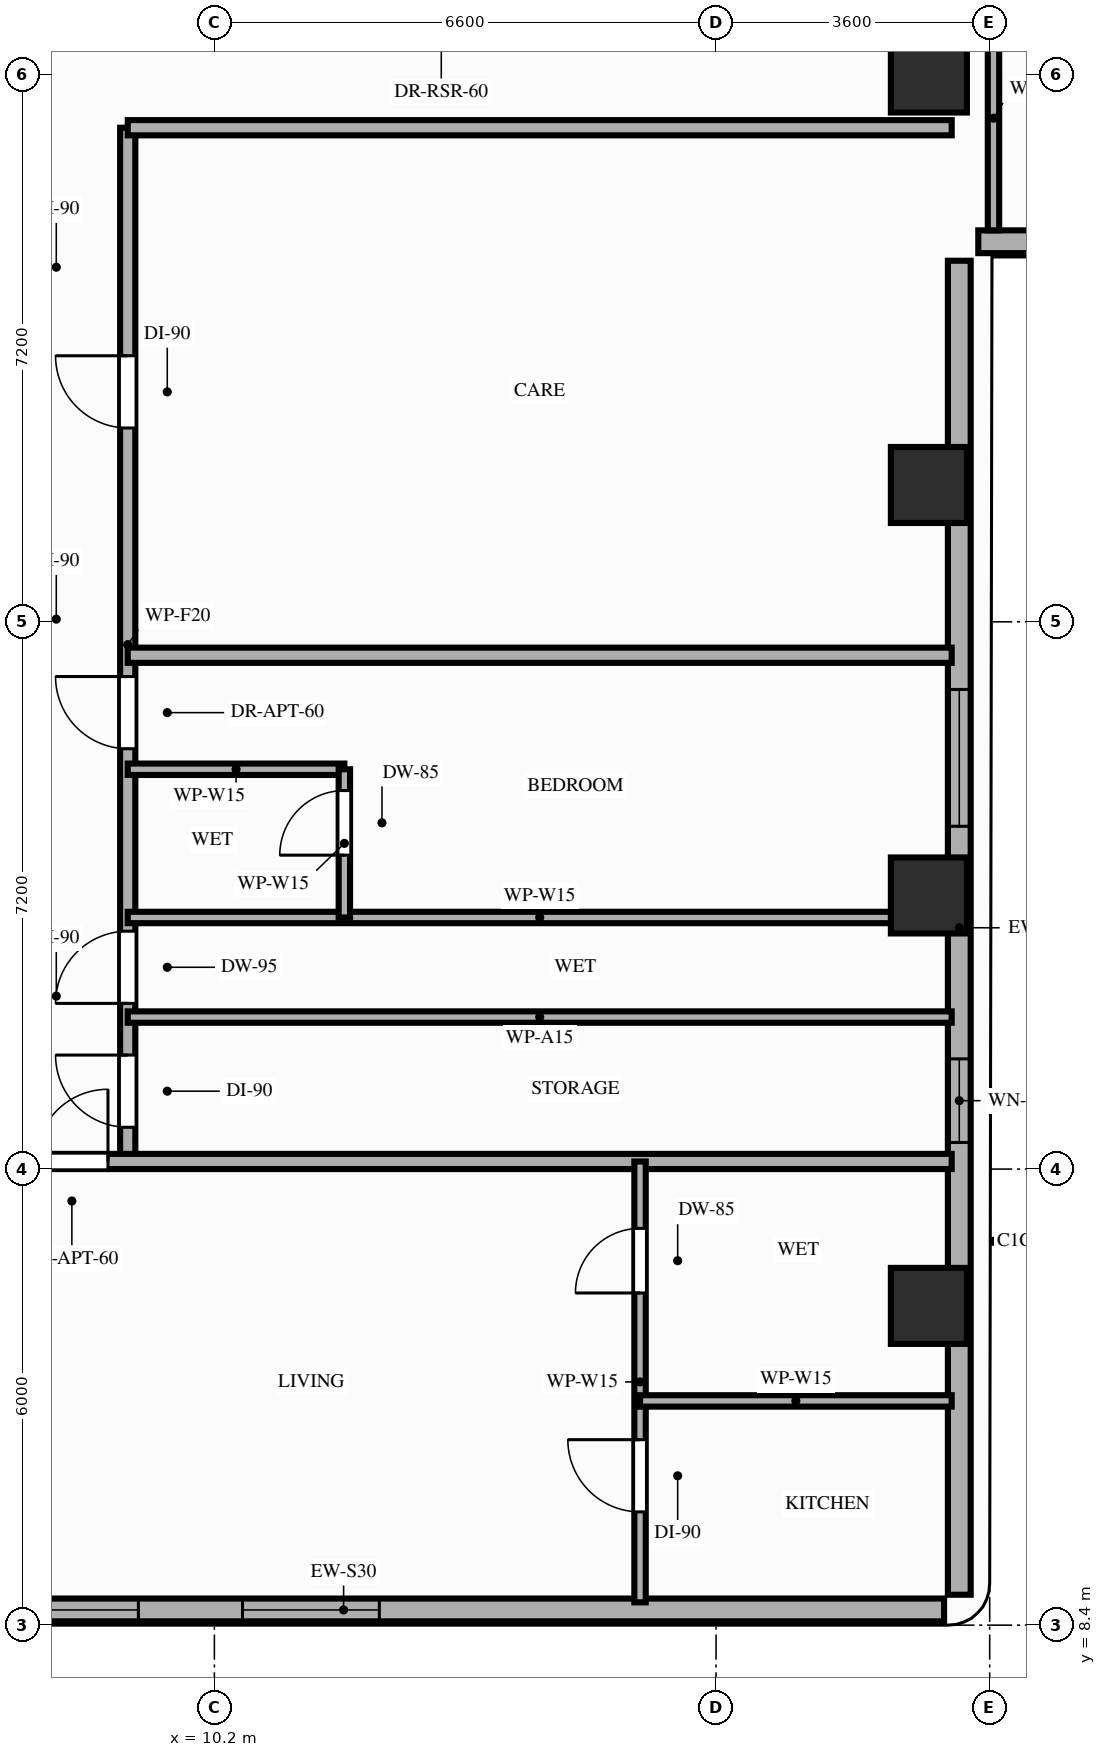
"""IFC4 building model, lengths in metres.
Left out: names, types, materials, properties, quantities, classifications, styles, units other than length and angle.
Written with IfcOpenShell. Run it as: python <this file> out.ifc"""

import sys

from ifc_helpers import new_model, si_unit, direction, frame, frame_2d, origin, origin_2d, place, context, subcontext, project, spatial, rectangle, extrude, element, fill, save


model = new_model("IFC4")
c1 = context("Model", 3, precision=1e-05, world=origin(), true_north=direction((0.0, 1.0)))
c2 = subcontext(c1, "Body", "Model", "MODEL_VIEW")
j1 = project(units=[si_unit("LENGTHUNIT", "METRE"), si_unit("PLANEANGLEUNIT", "RADIAN")], contexts=[c1])
p1 = place(None, origin())
s1 = spatial("IfcSite", under=j1, at=p1, CompositionType="ELEMENT")
p2 = place(p1, origin())
s2 = spatial("IfcBuilding", under=s1, at=p2, CompositionType="ELEMENT")
p3 = place(p2, frame((0.0, 0.0, 113.8)))
s3 = spatial("IfcBuildingStorey", under=s2, at=p3, CompositionType="ELEMENT", Elevation=113.8)
for number, where, z_axis, x_axis in (
    (1, (19.6, 12.6, 0.0), (0.0, 0.0, 1.0), (1.0, 0.0, 0.0)),
    (2, (19.6, 18.0, 0.0), (0.0, 0.0, 1.0), (1.0, 0.0, 0.0)),
    (3, (19.6, 23.4, 0.0), (0.0, 0.0, 1.0), (1.0, 0.0, 0.0)),
    (4, (19.6, 28.8, 0.0), (0.0, 0.0, 1.0), (1.0, 0.0, 0.0)),
):
    element("IfcColumn", number, at=place(p3, frame(where, z_axis=z_axis, x_axis=x_axis)), inside=s3, PredefinedType="COLUMN", context=c2, shape_type="SweptSolid", body=[
        extrude(rectangle(XDim=1.0, YDim=1.0, at=origin_2d()), origin(), (0.0, 0.0, 1.0), 3.2),
    ])
p4 = place(p3, frame((4.0, 8.6, 0.0), z_axis=(0.0, 0.0, 1.0), x_axis=(1.0, 0.0, 0.0)))
e5 = element("IfcWall", 5, at=p4, inside=s3, PredefinedType="STANDARD", context=c2, shape_type="SweptSolid", body=[
    extrude(rectangle(XDim=15.8, YDim=0.3, at=frame_2d((7.9, 0.0))), origin(), (0.0, 0.0, 1.0), 3.02),
])
p5 = place(p4, frame((6.57, 0.0, 0.85)))
e6 = element("IfcOpeningElement", 6, at=p5, cuts=e5, PredefinedType="OPENING", context=c2, shape_type="SweptSolid", body=[
    extrude(rectangle(XDim=1.8, YDim=1.75, at=frame_2d((0.9, 0.875))), frame((0.0, 0.16, 0.0), z_axis=(0.0, -1.0, 0.0), x_axis=(1.0, 0.0, 0.0)), (0.0, 0.0, 1.0), 0.32),
])
p6 = place(p4, frame((3.4, 0.0, 0.85)))
e7 = element("IfcOpeningElement", 7, at=p6, cuts=e5, PredefinedType="OPENING", context=c2, shape_type="SweptSolid", body=[
    extrude(rectangle(XDim=1.8, YDim=1.75, at=frame_2d((0.9, 0.875))), frame((0.0, 0.16, 0.0), z_axis=(0.0, -1.0, 0.0), x_axis=(1.0, 0.0, 0.0)), (0.0, 0.0, 1.0), 0.32),
])
p7 = place(p3, frame((20.0, 8.8, 0.0), z_axis=(0.0, 0.0, 1.0), x_axis=(0.0, 1.0, 0.0)))
e8 = element("IfcWall", 8, at=p7, inside=s3, PredefinedType="STANDARD", context=c2, shape_type="SweptSolid", body=[
    extrude(rectangle(XDim=17.55, YDim=0.3, at=frame_2d((8.775, 0.0))), origin(), (0.0, 0.0, 1.0), 2.4),
])
p8 = place(p7, frame((10.11, 0.0, 0.85)))
e9 = element("IfcOpeningElement", 9, at=p8, cuts=e8, PredefinedType="OPENING", context=c2, shape_type="SweptSolid", body=[
    extrude(rectangle(XDim=1.8, YDim=1.3, at=frame_2d((0.9, 0.65))), frame((0.0, 0.16, 0.0), z_axis=(0.0, -1.0, 0.0), x_axis=(1.0, 0.0, 0.0)), (0.0, 0.0, 1.0), 0.32),
])
p9 = place(p7, frame((5.95, 0.0, 0.85)))
e10 = element("IfcOpeningElement", 10, at=p9, cuts=e8, PredefinedType="OPENING", context=c2, shape_type="SweptSolid", body=[
    extrude(rectangle(XDim=1.1, YDim=1.3, at=frame_2d((0.55, 0.65))), frame((0.0, 0.16, 0.0), z_axis=(0.0, -1.0, 0.0), x_axis=(1.0, 0.0, 0.0)), (0.0, 0.0, 1.0), 0.32),
])
p10 = place(p3, frame((20.25, 26.6, 0.0), z_axis=(0.0, 0.0, 1.0), x_axis=(1.0, 0.0, 0.0)))
e11 = element("IfcWall", 11, at=p10, inside=s3, PredefinedType="STANDARD", context=c2, shape_type="SweptSolid", body=[
    extrude(rectangle(XDim=26.15, YDim=0.3, at=frame_2d((13.075, 0.0))), origin(), (0.0, 0.0, 1.0), 2.7),
])
p11 = place(p10, frame((13.85, 0.0, 0.0)))
e12 = element("IfcOpeningElement", 12, at=p11, cuts=e11, PredefinedType="OPENING", context=c2, shape_type="SweptSolid", body=[
    extrude(rectangle(XDim=1.4, YDim=2.1, at=frame_2d((0.7, 1.05))), frame((0.0, 0.16, 0.0), z_axis=(0.0, -1.0, 0.0), x_axis=(1.0, 0.0, 0.0)), (0.0, 0.0, 1.0), 0.32),
])
p12 = place(p10, frame((2.65, 0.0, 0.85)))
e13 = element("IfcOpeningElement", 13, at=p12, cuts=e11, PredefinedType="OPENING", context=c2, shape_type="SweptSolid", body=[
    extrude(rectangle(XDim=1.8, YDim=1.6, at=frame_2d((0.9, 0.8))), frame((0.0, 0.16, 0.0), z_axis=(0.0, -1.0, 0.0), x_axis=(1.0, 0.0, 0.0)), (0.0, 0.0, 1.0), 0.32),
])
p13 = place(p10, frame((7.75, 0.0, 0.85)))
e14 = element("IfcOpeningElement", 14, at=p13, cuts=e11, PredefinedType="OPENING", context=c2, shape_type="SweptSolid", body=[
    extrude(rectangle(XDim=1.8, YDim=1.6, at=frame_2d((0.9, 0.8))), frame((0.0, 0.16, 0.0), z_axis=(0.0, -1.0, 0.0), x_axis=(1.0, 0.0, 0.0)), (0.0, 0.0, 1.0), 0.32),
])
p14 = place(p10, frame((22.25, 0.0, 0.85)))
e15 = element("IfcOpeningElement", 15, at=p14, cuts=e11, PredefinedType="OPENING", context=c2, shape_type="SweptSolid", body=[
    extrude(rectangle(XDim=1.8, YDim=1.6, at=frame_2d((0.9, 0.8))), frame((0.0, 0.16, 0.0), z_axis=(0.0, -1.0, 0.0), x_axis=(1.0, 0.0, 0.0)), (0.0, 0.0, 1.0), 0.32),
])
p15 = place(p3, frame((9.06, 14.5, 0.0), z_axis=(0.0, 0.0, 1.0), x_axis=(0.0, 1.0, 0.0)))
e16 = element("IfcWall", 16, at=p15, inside=s3, PredefinedType="PARTITIONING", context=c2, shape_type="SweptSolid", body=[
    extrude(rectangle(XDim=13.6, YDim=0.2, at=frame_2d((6.8, 0.0))), origin(), (0.0, 0.0, 1.0), 2.4),
])
p16 = place(p15, frame((0.45, 0.0, 0.0)))
e17 = element("IfcOpeningElement", 17, at=p16, cuts=e16, PredefinedType="OPENING", context=c2, shape_type="SweptSolid", body=[
    extrude(rectangle(XDim=0.95, YDim=2.15, at=frame_2d((0.475, 1.075))), frame((0.0, 0.11, 0.0), z_axis=(0.0, -1.0, 0.0), x_axis=(1.0, 0.0, 0.0)), (0.0, 0.0, 1.0), 0.22),
])
p17 = place(p15, frame((2.08, 0.0, 0.0)))
e18 = element("IfcOpeningElement", 18, at=p17, cuts=e16, PredefinedType="OPENING", context=c2, shape_type="SweptSolid", body=[
    extrude(rectangle(XDim=0.95, YDim=2.1, at=frame_2d((0.475, 1.05))), frame((0.0, 0.11, 0.0), z_axis=(0.0, -1.0, 0.0), x_axis=(1.0, 0.0, 0.0)), (0.0, 0.0, 1.0), 0.22),
])
p18 = place(p15, frame((9.65, 0.0, 0.0)))
e19 = element("IfcOpeningElement", 19, at=p18, cuts=e16, PredefinedType="OPENING", context=c2, shape_type="SweptSolid", body=[
    extrude(rectangle(XDim=0.95, YDim=2.15, at=frame_2d((0.475, 1.075))), frame((0.0, 0.11, 0.0), z_axis=(0.0, -1.0, 0.0), x_axis=(1.0, 0.0, 0.0)), (0.0, 0.0, 1.0), 0.22),
])
p19 = place(p15, frame((5.43, 0.0, 0.0)))
e20 = element("IfcOpeningElement", 20, at=p19, cuts=e16, PredefinedType="OPENING", context=c2, shape_type="SweptSolid", body=[
    extrude(rectangle(XDim=0.95, YDim=2.15, at=frame_2d((0.475, 1.075))), frame((0.0, 0.11, 0.0), z_axis=(0.0, -1.0, 0.0), x_axis=(1.0, 0.0, 0.0)), (0.0, 0.0, 1.0), 0.22),
])
p20 = place(p3, frame((3.9, 14.5, 0.0), z_axis=(0.0, 0.0, 1.0), x_axis=(1.0, 0.0, 0.0)))
e21 = element("IfcWall", 21, at=p20, inside=s3, PredefinedType="PARTITIONING", context=c2, shape_type="SweptSolid", body=[
    extrude(rectangle(XDim=16.0, YDim=0.2, at=frame_2d((8.0, 0.0))), origin(), (0.0, 0.0, 1.0), 2.4),
])
p21 = place(p20, frame((3.95, 0.0, 0.0)))
e22 = element("IfcOpeningElement", 22, at=p21, cuts=e21, PredefinedType="OPENING", context=c2, shape_type="SweptSolid", body=[
    extrude(rectangle(XDim=0.95, YDim=2.15, at=frame_2d((0.475, 1.075))), frame((0.0, 0.11, 0.0), z_axis=(0.0, -1.0, 0.0), x_axis=(1.0, 0.0, 0.0)), (0.0, 0.0, 1.0), 0.22),
])
p22 = place(p3, frame((9.06, 28.1, 0.0), z_axis=(0.0, 0.0, 1.0), x_axis=(1.0, 0.0, 0.0)))
e23 = element("IfcWall", 23, at=p22, inside=s3, PredefinedType="PARTITIONING", context=c2, shape_type="SweptSolid", body=[
    extrude(rectangle(XDim=10.84, YDim=0.2, at=frame_2d((5.42, 0.0))), origin(), (0.0, 0.0, 1.0), 2.4),
])
p23 = place(p3, frame((20.45, 26.75, 0.0), z_axis=(0.0, 0.0, 1.0), x_axis=(0.0, 1.0, 0.0)))
e24 = element("IfcWall", 24, at=p23, inside=s3, PredefinedType="PARTITIONING", context=c2, shape_type="SweptSolid", body=[
    extrude(rectangle(XDim=2.95, YDim=0.15, at=frame_2d((1.475, 0.0))), origin(), (0.0, 0.0, 1.0), 2.4),
])
p24 = place(p3, frame((15.8, 8.7, 0.0), z_axis=(0.0, 0.0, 1.0), x_axis=(0.0, 1.0, 0.0)))
e25 = element("IfcWall", 25, at=p24, inside=s3, PredefinedType="PARTITIONING", context=c2, shape_type="SweptSolid", body=[
    extrude(rectangle(XDim=5.8, YDim=0.15, at=frame_2d((2.9, 0.0))), origin(), (0.0, 0.0, 1.0), 2.4),
])
p25 = place(p24, frame((1.19, 0.0, 0.0)))
e26 = element("IfcOpeningElement", 26, at=p25, cuts=e25, PredefinedType="OPENING", context=c2, shape_type="SweptSolid", body=[
    extrude(rectangle(XDim=0.95, YDim=2.15, at=frame_2d((0.475, 1.075))), frame((0.0, 0.085, 0.0), z_axis=(0.0, -1.0, 0.0), x_axis=(1.0, 0.0, 0.0)), (0.0, 0.0, 1.0), 0.17),
])
p26 = place(p24, frame((4.07, 0.0, 0.0)))
e27 = element("IfcOpeningElement", 27, at=p26, cuts=e25, PredefinedType="OPENING", context=c2, shape_type="SweptSolid", body=[
    extrude(rectangle(XDim=0.85, YDim=2.1, at=frame_2d((0.425, 1.05))), frame((0.0, 0.085, 0.0), z_axis=(0.0, -1.0, 0.0), x_axis=(1.0, 0.0, 0.0)), (0.0, 0.0, 1.0), 0.17),
])
p27 = place(p3, frame((15.8, 11.35, 0.0), z_axis=(0.0, 0.0, 1.0), x_axis=(1.0, 0.0, 0.0)))
e28 = element("IfcWall", 28, at=p27, inside=s3, PredefinedType="PARTITIONING", context=c2, shape_type="SweptSolid", body=[
    extrude(rectangle(XDim=4.1, YDim=0.15, at=frame_2d((2.05, 0.0))), origin(), (0.0, 0.0, 1.0), 3.02),
])
for number, where, z_axis, x_axis in (
    (29, (9.06, 16.4, 0.0), (0.0, 0.0, 1.0), (1.0, 0.0, 0.0)),
    (30, (9.06, 17.71, 0.0), (0.0, 0.0, 1.0), (1.0, 0.0, 0.0)),
):
    element("IfcWall", number, at=place(p3, frame(where, z_axis=z_axis, x_axis=x_axis)), inside=s3, PredefinedType="PARTITIONING", context=c2, shape_type="SweptSolid", body=[
        extrude(rectangle(XDim=10.84, YDim=0.15, at=frame_2d((5.42, 0.0))), origin(), (0.0, 0.0, 1.0), 2.4),
    ])
p28 = place(p3, frame((9.06, 21.16, 0.0), z_axis=(0.0, 0.0, 1.0), x_axis=(1.0, 0.0, 0.0)))
e31 = element("IfcWall", 31, at=p28, inside=s3, PredefinedType="PARTITIONING", context=c2, shape_type="SweptSolid", body=[
    extrude(rectangle(XDim=10.84, YDim=0.2, at=frame_2d((5.42, 0.0))), origin(), (0.0, 0.0, 1.0), 2.4),
])
p29 = place(p3, frame((9.06, 19.66, 0.0), z_axis=(0.0, 0.0, 1.0), x_axis=(1.0, 0.0, 0.0)))
e32 = element("IfcWall", 32, at=p29, inside=s3, PredefinedType="PARTITIONING", context=c2, shape_type="SweptSolid", body=[
    extrude(rectangle(XDim=2.85, YDim=0.15, at=frame_2d((1.425, 0.0))), origin(), (0.0, 0.0, 1.0), 2.7),
])
p30 = place(p3, frame((11.91, 17.71, 0.0), z_axis=(0.0, 0.0, 1.0), x_axis=(0.0, 1.0, 0.0)))
e33 = element("IfcWall", 33, at=p30, inside=s3, PredefinedType="PARTITIONING", context=c2, shape_type="SweptSolid", body=[
    extrude(rectangle(XDim=1.95, YDim=0.15, at=frame_2d((0.975, 0.0))), origin(), (0.0, 0.0, 1.0), 2.4),
])
p31 = place(p30, frame((0.82, 0.0, 0.0)))
e34 = element("IfcOpeningElement", 34, at=p31, cuts=e33, PredefinedType="OPENING", context=c2, shape_type="SweptSolid", body=[
    extrude(rectangle(XDim=0.85, YDim=2.1, at=frame_2d((0.425, 1.05))), frame((0.0, 0.085, 0.0), z_axis=(0.0, -1.0, 0.0), x_axis=(1.0, 0.0, 0.0)), (0.0, 0.0, 1.0), 0.17),
])
p32 = place(p5, origin())
e35 = element("IfcWindow", 35, at=p32, inside=s3, PartitioningType="SINGLE_PANEL", PredefinedType="WINDOW", context=c2, shape_type="SweptSolid", body=[
    extrude(rectangle(XDim=1.8, YDim=1.75, at=frame_2d((0.9, 0.875))), frame((0.0, 0.03, 0.0), z_axis=(0.0, -1.0, 0.0), x_axis=(1.0, 0.0, 0.0)), (0.0, 0.0, 1.0), 0.06),
])
fill(e6, e35)
p33 = place(p8, origin())
e36 = element("IfcWindow", 36, at=p33, inside=s3, PartitioningType="SINGLE_PANEL", PredefinedType="WINDOW", context=c2, shape_type="SweptSolid", body=[
    extrude(rectangle(XDim=1.8, YDim=1.3, at=frame_2d((0.9, 0.65))), frame((0.0, 0.03, 0.0), z_axis=(0.0, -1.0, 0.0), x_axis=(1.0, 0.0, 0.0)), (0.0, 0.0, 1.0), 0.06),
])
fill(e9, e36)
p34 = place(p9, origin())
e37 = element("IfcWindow", 37, at=p34, inside=s3, PartitioningType="SINGLE_PANEL", PredefinedType="WINDOW", context=c2, shape_type="SweptSolid", body=[
    extrude(rectangle(XDim=1.1, YDim=1.3, at=frame_2d((0.55, 0.65))), frame((0.0, 0.03, 0.0), z_axis=(0.0, -1.0, 0.0), x_axis=(1.0, 0.0, 0.0)), (0.0, 0.0, 1.0), 0.06),
])
fill(e10, e37)
p35 = place(p6, origin())
e38 = element("IfcWindow", 38, at=p35, inside=s3, PartitioningType="SINGLE_PANEL", PredefinedType="WINDOW", context=c2, shape_type="SweptSolid", body=[
    extrude(rectangle(XDim=1.8, YDim=1.75, at=frame_2d((0.9, 0.875))), frame((0.0, 0.03, 0.0), z_axis=(0.0, -1.0, 0.0), x_axis=(1.0, 0.0, 0.0)), (0.0, 0.0, 1.0), 0.06),
])
fill(e7, e38)
p36 = place(p21, origin())
e39 = element("IfcDoor", 39, at=p36, inside=s3, OperationType="SINGLE_SWING_RIGHT", PredefinedType="DOOR", context=c2, shape_type="SweptSolid", body=[
    extrude(rectangle(XDim=0.95, YDim=2.15, at=frame_2d((0.475, 1.075))), frame((0.0, 0.025, 0.0), z_axis=(0.0, -1.0, 0.0), x_axis=(1.0, 0.0, 0.0)), (0.0, 0.0, 1.0), 0.05),
])
fill(e22, e39)
p37 = place(p25, origin())
e40 = element("IfcDoor", 40, at=p37, inside=s3, OperationType="SINGLE_SWING_RIGHT", PredefinedType="DOOR", context=c2, shape_type="SweptSolid", body=[
    extrude(rectangle(XDim=0.95, YDim=2.15, at=frame_2d((0.475, 1.075))), frame((0.0, 0.025, 0.0), z_axis=(0.0, -1.0, 0.0), x_axis=(1.0, 0.0, 0.0)), (0.0, 0.0, 1.0), 0.05),
])
fill(e26, e40)
p38 = place(p26, origin())
e41 = element("IfcDoor", 41, at=p38, inside=s3, OperationType="SINGLE_SWING_LEFT", PredefinedType="DOOR", context=c2, shape_type="SweptSolid", body=[
    extrude(rectangle(XDim=0.85, YDim=2.1, at=frame_2d((0.425, 1.05))), frame((0.0, 0.025, 0.0), z_axis=(0.0, -1.0, 0.0), x_axis=(1.0, 0.0, 0.0)), (0.0, 0.0, 1.0), 0.05),
])
fill(e27, e41)
p39 = place(p16, origin())
e42 = element("IfcDoor", 42, at=p39, inside=s3, OperationType="SINGLE_SWING_RIGHT", PredefinedType="DOOR", context=c2, shape_type="SweptSolid", body=[
    extrude(rectangle(XDim=0.95, YDim=2.15, at=frame_2d((0.475, 1.075))), frame((0.0, 0.025, 0.0), z_axis=(0.0, -1.0, 0.0), x_axis=(1.0, 0.0, 0.0)), (0.0, 0.0, 1.0), 0.05),
])
fill(e17, e42)
p40 = place(p17, origin())
e43 = element("IfcDoor", 43, at=p40, inside=s3, OperationType="SINGLE_SWING_LEFT", PredefinedType="DOOR", context=c2, shape_type="SweptSolid", body=[
    extrude(rectangle(XDim=0.95, YDim=2.1, at=frame_2d((0.475, 1.05))), frame((0.0, 0.025, 0.0), z_axis=(0.0, -1.0, 0.0), x_axis=(1.0, 0.0, 0.0)), (0.0, 0.0, 1.0), 0.05),
])
fill(e18, e43)
p41 = place(p18, origin())
e44 = element("IfcDoor", 44, at=p41, inside=s3, OperationType="SINGLE_SWING_RIGHT", PredefinedType="DOOR", context=c2, shape_type="SweptSolid", body=[
    extrude(rectangle(XDim=0.95, YDim=2.15, at=frame_2d((0.475, 1.075))), frame((0.0, 0.025, 0.0), z_axis=(0.0, -1.0, 0.0), x_axis=(1.0, 0.0, 0.0)), (0.0, 0.0, 1.0), 0.05),
])
fill(e19, e44)
p42 = place(p31, origin())
e45 = element("IfcDoor", 45, at=p42, inside=s3, OperationType="SINGLE_SWING_LEFT", PredefinedType="DOOR", context=c2, shape_type="SweptSolid", body=[
    extrude(rectangle(XDim=0.85, YDim=2.1, at=frame_2d((0.425, 1.05))), frame((0.0, 0.025, 0.0), z_axis=(0.0, -1.0, 0.0), x_axis=(1.0, 0.0, 0.0)), (0.0, 0.0, 1.0), 0.05),
])
fill(e34, e45)
p43 = place(p19, origin())
e46 = element("IfcDoor", 46, at=p43, inside=s3, OperationType="SINGLE_SWING_RIGHT", PredefinedType="DOOR", context=c2, shape_type="SweptSolid", body=[
    extrude(rectangle(XDim=0.95, YDim=2.15, at=frame_2d((0.475, 1.075))), frame((0.0, 0.025, 0.0), z_axis=(0.0, -1.0, 0.0), x_axis=(1.0, 0.0, 0.0)), (0.0, 0.0, 1.0), 0.05),
])
fill(e20, e46)
save(model, sys.argv[1])
